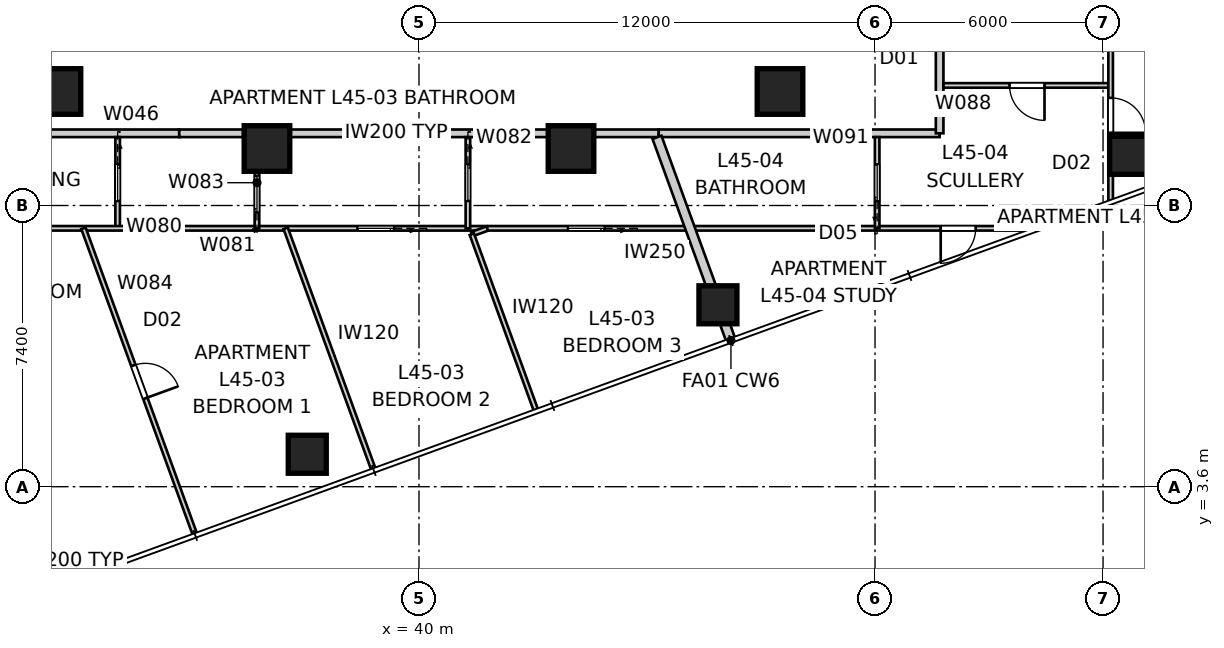
"""IFC4 building model, lengths in metres.
Left out: names, types, materials, properties, quantities, classifications, styles, units other than length and angle.
Written with IfcOpenShell. Run it as: python <this file> out.ifc"""

import sys

from ifc_helpers import new_model, si_unit, direction, frame, frame_2d, origin, origin_2d, place, context, subcontext, project, spatial, rectangle, extrude, element, fill, save


model = new_model("IFC4")
c1 = context("Model", 3, precision=1e-05, world=origin(), true_north=direction((0.0, 1.0)))
c2 = subcontext(c1, "Body", "Model", "MODEL_VIEW")
j1 = project(units=[si_unit("LENGTHUNIT", "METRE"), si_unit("PLANEANGLEUNIT", "RADIAN")], contexts=[c1])
p1 = place(None, origin())
s1 = spatial("IfcSite", under=j1, at=p1, CompositionType="ELEMENT")
p2 = place(p1, origin())
s2 = spatial("IfcBuilding", under=s1, at=p2, CompositionType="ELEMENT")
p3 = place(p2, frame((0.0, 0.0, 164.2)))
s3 = spatial("IfcBuildingStorey", under=s2, at=p3, CompositionType="ELEMENT", Elevation=164.2)
for number, where, z_axis, x_axis in (
    (1, (37.06, 4.454, 0.0), (0.0, 0.0, 1.0), (1.0, 0.0, 0.0)),
    (2, (47.866, 8.387, 0.0), (0.0, 0.0, 1.0), (1.0, 0.0, 0.0)),
    (3, (58.673, 12.32, 0.0), (0.0, 0.0, 1.0), (1.0, 0.0, 0.0)),
):
    element("IfcColumn", number, at=place(p3, frame(where, z_axis=z_axis, x_axis=x_axis)), inside=s3, PredefinedType="COLUMN", context=c2, shape_type="SweptSolid", body=[
        extrude(rectangle(XDim=1.0, YDim=1.0, at=origin_2d()), origin(), (0.0, 0.0, 1.0), 3.4),
    ])
for number, where, z_axis, x_axis in (
    (4, (30.5, 14.0, 0.0), (0.0, 0.0, 1.0), (1.0, 0.0, 0.0)),
    (5, (36.0, 12.5, 0.0), (0.0, 0.0, 1.0), (1.0, 0.0, 0.0)),
    (6, (44.0, 12.5, 0.0), (0.0, 0.0, 1.0), (1.0, 0.0, 0.0)),
    (7, (49.5, 14.0, 0.0), (0.0, 0.0, 1.0), (1.0, 0.0, 0.0)),
):
    element("IfcColumn", number, at=place(p3, frame(where, z_axis=z_axis, x_axis=x_axis)), inside=s3, PredefinedType="COLUMN", context=c2, shape_type="SweptSolid", body=[
        extrude(rectangle(XDim=1.2, YDim=1.2, at=origin_2d()), origin(), (0.0, 0.0, 1.0), 3.4),
    ])
p4 = place(p3, frame((25.5, 12.9, 0.0), z_axis=(0.0, 0.0, 1.0), x_axis=(1.0, 0.0, 0.0)))
e8 = element("IfcWall", 8, at=p4, inside=s3, PredefinedType="PARTITIONING", context=c2, shape_type="SweptSolid", body=[
    extrude(rectangle(XDim=8.192, YDim=0.2, at=frame_2d((4.096, 0.0))), origin(), (0.0, 0.0, 1.0), 3.25),
])
p5 = place(p4, frame((2.95, 0.0, 0.0)))
e9 = element("IfcOpeningElement", 9, at=p5, cuts=e8, PredefinedType="OPENING", context=c2, shape_type="SweptSolid", body=[
    extrude(rectangle(XDim=1.02, YDim=2.34, at=frame_2d((0.51, 1.17))), frame((0.0, 0.11, 0.0), z_axis=(0.0, -1.0, 0.0), x_axis=(1.0, 0.0, 0.0)), (0.0, 0.0, 1.0), 0.22),
])
p6 = place(p3, frame((33.692, 12.9, 0.0), z_axis=(0.0, 0.0, 1.0), x_axis=(1.0, 0.0, 0.0)))
e10 = element("IfcWall", 10, at=p6, inside=s3, PredefinedType="PARTITIONING", context=c2, shape_type="SweptSolid", body=[
    extrude(rectangle(XDim=1.683, YDim=0.2, at=frame_2d((0.842, 0.0))), origin(), (0.0, 0.0, 1.0), 2.55),
])
p7 = place(p3, frame((35.375, 12.9, 0.0), z_axis=(0.0, 0.0, 1.0), x_axis=(1.0, 0.0, 0.0)))
e11 = element("IfcWall", 11, at=p7, inside=s3, PredefinedType="PARTITIONING", context=c2, shape_type="SweptSolid", body=[
    extrude(rectangle(XDim=9.25, YDim=0.2, at=frame_2d((4.625, 0.0))), origin(), (0.0, 0.0, 1.0), 3.25),
])
p8 = place(p3, frame((44.625, 12.9, 0.0), z_axis=(0.0, 0.0, 1.0), x_axis=(1.0, 0.0, 0.0)))
e12 = element("IfcWall", 12, at=p8, inside=s3, PredefinedType="PARTITIONING", context=c2, shape_type="SweptSolid", body=[
    extrude(rectangle(XDim=1.683, YDim=0.2, at=frame_2d((0.842, 0.0))), origin(), (0.0, 0.0, 1.0), 2.55),
])
p9 = place(p3, frame((46.308, 12.9, 0.0), z_axis=(0.0, 0.0, 1.0), x_axis=(1.0, 0.0, 0.0)))
e13 = element("IfcWall", 13, at=p9, inside=s3, PredefinedType="PARTITIONING", context=c2, shape_type="SweptSolid", body=[
    extrude(rectangle(XDim=7.392, YDim=0.2, at=frame_2d((3.696, 0.0))), origin(), (0.0, 0.0, 1.0), 3.25),
])
p10 = place(p3, frame((53.7, 12.9, 0.0), z_axis=(0.0, 0.0, 1.0), x_axis=(0.0, 1.0, 0.0)))
e14 = element("IfcWall", 14, at=p10, inside=s3, PredefinedType="PARTITIONING", context=c2, shape_type="SweptSolid", body=[
    extrude(rectangle(XDim=33.8, YDim=0.2, at=frame_2d((16.9, 0.0))), origin(), (0.0, 0.0, 1.0), 3.25),
])
p11 = place(p10, frame((29.25, 0.0, 0.0)))
e15 = element("IfcOpeningElement", 15, at=p11, cuts=e14, PredefinedType="OPENING", context=c2, shape_type="SweptSolid", body=[
    extrude(rectangle(XDim=1.02, YDim=2.1, at=frame_2d((0.51, 1.05))), frame((0.0, 0.11, 0.0), z_axis=(0.0, -1.0, 0.0), x_axis=(1.0, 0.0, 0.0)), (0.0, 0.0, 1.0), 0.22),
])
p12 = place(p10, frame((2.87, 0.0, 0.0)))
e16 = element("IfcOpeningElement", 16, at=p12, cuts=e14, PredefinedType="OPENING", context=c2, shape_type="SweptSolid", body=[
    extrude(rectangle(XDim=1.02, YDim=2.34, at=frame_2d((0.51, 1.17))), frame((0.0, 0.11, 0.0), z_axis=(0.0, -1.0, 0.0), x_axis=(1.0, 0.0, 0.0)), (0.0, 0.0, 1.0), 0.22),
])
p13 = place(p3, frame((48.208, 7.447, 0.0), z_axis=(0.0, 0.0, 1.0), x_axis=(-0.342004838392, 0.939698191185, 0.0)))
e17 = element("IfcWall", 17, at=p13, inside=s3, PredefinedType="PARTITIONING", context=c2, shape_type="SweptSolid", body=[
    extrude(rectangle(XDim=5.691, YDim=0.25, at=frame_2d((2.845, 0.0))), origin(), (0.0, 0.0, 1.0), 3.25),
])
p14 = place(p3, frame((32.071, 12.8, 0.0), z_axis=(0.0, 0.0, 1.0), x_axis=(0.0, -1.0, 0.0)))
e18 = element("IfcWall", 18, at=p14, inside=s3, PredefinedType="PARTITIONING", context=c2, shape_type="SweptSolid", body=[
    extrude(rectangle(XDim=2.4, YDim=0.12, at=frame_2d((1.2, 0.0))), origin(), (0.0, 0.0, 1.0), 3.25),
])
p15 = place(p14, frame((0.72, 0.0, 0.0)))
e19 = element("IfcOpeningElement", 19, at=p15, cuts=e18, PredefinedType="OPENING", context=c2, shape_type="SweptSolid", body=[
    extrude(rectangle(XDim=0.96, YDim=2.1, at=frame_2d((0.48, 1.05))), frame((0.0, 0.07, 0.0), z_axis=(0.0, -1.0, 0.0), x_axis=(1.0, 0.0, 0.0)), (0.0, 0.0, 1.0), 0.14),
])
p16 = place(p3, frame((56.281, 10.4, 0.0), z_axis=(0.0, 0.0, 1.0), x_axis=(-1.0, 0.0, 0.0)))
e20 = element("IfcWall", 20, at=p16, inside=s3, PredefinedType="PARTITIONING", context=c2, shape_type="SweptSolid", body=[
    extrude(rectangle(XDim=34.647, YDim=0.12, at=frame_2d((17.324, 0.0))), origin(), (0.0, 0.0, 1.0), 3.25),
])
p17 = place(p16, frame((29.309, 0.0, 0.0)))
e21 = element("IfcOpeningElement", 21, at=p17, cuts=e20, PredefinedType="OPENING", context=c2, shape_type="SweptSolid", body=[
    extrude(rectangle(XDim=0.92, YDim=2.34, at=frame_2d((0.46, 1.17))), frame((0.0, 0.07, 0.0), z_axis=(0.0, -1.0, 0.0), x_axis=(1.0, 0.0, 0.0)), (0.0, 0.0, 1.0), 0.14),
])
p18 = place(p16, frame((1.632, 0.0, 0.0)))
e22 = element("IfcOpeningElement", 22, at=p18, cuts=e20, PredefinedType="OPENING", context=c2, shape_type="SweptSolid", body=[
    extrude(rectangle(XDim=0.92, YDim=2.1, at=frame_2d((0.46, 1.05))), frame((0.0, 0.07, 0.0), z_axis=(0.0, -1.0, 0.0), x_axis=(1.0, 0.0, 0.0)), (0.0, 0.0, 1.0), 0.14),
])
p19 = place(p16, frame((16.938, 0.0, 0.0)))
e23 = element("IfcOpeningElement", 23, at=p19, cuts=e20, PredefinedType="OPENING", context=c2, shape_type="SweptSolid", body=[
    extrude(rectangle(XDim=0.96, YDim=2.1, at=frame_2d((0.48, 1.05))), frame((0.0, 0.07, 0.0), z_axis=(0.0, -1.0, 0.0), x_axis=(1.0, 0.0, 0.0)), (0.0, 0.0, 1.0), 0.14),
])
p20 = place(p16, frame((11.4, 0.0, 0.0)))
e24 = element("IfcOpeningElement", 24, at=p20, cuts=e20, PredefinedType="OPENING", context=c2, shape_type="SweptSolid", body=[
    extrude(rectangle(XDim=0.96, YDim=2.1, at=frame_2d((0.48, 1.05))), frame((0.0, 0.07, 0.0), z_axis=(0.0, -1.0, 0.0), x_axis=(1.0, 0.0, 0.0)), (0.0, 0.0, 1.0), 0.14),
])
p21 = place(p3, frame((41.287, 12.8, 0.0), z_axis=(0.0, 0.0, 1.0), x_axis=(0.0, -1.0, 0.0)))
e25 = element("IfcWall", 25, at=p21, inside=s3, PredefinedType="PARTITIONING", context=c2, shape_type="SweptSolid", body=[
    extrude(rectangle(XDim=2.4, YDim=0.12, at=frame_2d((1.2, 0.0))), origin(), (0.0, 0.0, 1.0), 3.25),
])
p22 = place(p21, frame((0.72, 0.0, 0.0)))
e26 = element("IfcOpeningElement", 26, at=p22, cuts=e25, PredefinedType="OPENING", context=c2, shape_type="SweptSolid", body=[
    extrude(rectangle(XDim=0.96, YDim=2.1, at=frame_2d((0.48, 1.05))), frame((0.0, 0.07, 0.0), z_axis=(0.0, -1.0, 0.0), x_axis=(1.0, 0.0, 0.0)), (0.0, 0.0, 1.0), 0.14),
])
p23 = place(p3, frame((35.737, 10.4, 0.0), z_axis=(0.0, 0.0, 1.0), x_axis=(0.0, 1.0, 0.0)))
e27 = element("IfcWall", 27, at=p23, inside=s3, PredefinedType="PARTITIONING", context=c2, shape_type="SweptSolid", body=[
    extrude(rectangle(XDim=2.4, YDim=0.12, at=frame_2d((1.2, 0.0))), origin(), (0.0, 0.0, 1.0), 3.25),
])
p24 = place(p23, frame((0.42, 0.0, 0.0)))
e28 = element("IfcOpeningElement", 28, at=p24, cuts=e27, PredefinedType="OPENING", context=c2, shape_type="SweptSolid", body=[
    extrude(rectangle(XDim=0.96, YDim=2.1, at=frame_2d((0.48, 1.05))), frame((0.0, 0.07, 0.0), z_axis=(0.0, -1.0, 0.0), x_axis=(1.0, 0.0, 0.0)), (0.0, 0.0, 1.0), 0.14),
])
p25 = place(p3, frame((31.171, 10.4, 0.0), z_axis=(0.0, 0.0, 1.0), x_axis=(0.34202238111, -0.939691806296, 0.0)))
e29 = element("IfcWall", 29, at=p25, inside=s3, PredefinedType="PARTITIONING", context=c2, shape_type="SweptSolid", body=[
    extrude(rectangle(XDim=8.562, YDim=0.12, at=frame_2d((4.281, 0.0))), origin(), (0.0, 0.0, 1.0), 3.25),
])
p26 = place(p25, frame((3.841, 0.0, 0.0)))
e30 = element("IfcOpeningElement", 30, at=p26, cuts=e29, PredefinedType="OPENING", context=c2, shape_type="SweptSolid", body=[
    extrude(rectangle(XDim=0.92, YDim=2.34, at=frame_2d((0.46, 1.17))), frame((0.0, 0.07, 0.0), z_axis=(0.0, -1.0, 0.0), x_axis=(1.0, 0.0, 0.0)), (0.0, 0.0, 1.0), 0.14),
])
p27 = place(p3, frame((36.492, 10.4, 0.0), z_axis=(0.0, 0.0, 1.0), x_axis=(0.342030900012, -0.939688705602, 0.0)))
e31 = element("IfcWall", 31, at=p27, inside=s3, PredefinedType="PARTITIONING", context=c2, shape_type="SweptSolid", body=[
    extrude(rectangle(XDim=6.742, YDim=0.12, at=frame_2d((3.371, 0.0))), origin(), (0.0, 0.0, 1.0), 3.25),
])
p28 = place(p3, frame((41.799, 10.395, 0.0), z_axis=(0.0, 0.0, 1.0), x_axis=(-0.939678576029, -0.342058728513, 0.0)))
e32 = element("IfcWall", 32, at=p28, inside=s3, PredefinedType="PARTITIONING", context=c2, shape_type="SweptSolid", body=[
    extrude(rectangle(XDim=0.435, YDim=0.12, at=frame_2d((0.217, 0.0))), origin(), (0.0, 0.0, 1.0), 3.25),
])
p29 = place(p3, frame((41.39, 10.246, 0.0), z_axis=(0.0, 0.0, 1.0), x_axis=(0.342017860496, -0.939693451665, 0.0)))
e33 = element("IfcWall", 33, at=p29, inside=s3, PredefinedType="PARTITIONING", context=c2, shape_type="SweptSolid", body=[
    extrude(rectangle(XDim=4.922, YDim=0.12, at=frame_2d((2.461, 0.0))), origin(), (0.0, 0.0, 1.0), 3.25),
])
p30 = place(p3, frame((58.2, 14.16, 0.0), z_axis=(0.0, 0.0, 1.0), x_axis=(-1.0, 0.0, 0.0)))
e34 = element("IfcWall", 34, at=p30, inside=s3, PredefinedType="PARTITIONING", context=c2, shape_type="SweptSolid", body=[
    extrude(rectangle(XDim=4.4, YDim=0.12, at=frame_2d((2.2, 0.0))), origin(), (0.0, 0.0, 1.0), 3.25),
])
p31 = place(p30, frame((1.74, 0.0, 0.0)))
e35 = element("IfcOpeningElement", 35, at=p31, cuts=e34, PredefinedType="OPENING", context=c2, shape_type="SweptSolid", body=[
    extrude(rectangle(XDim=0.92, YDim=2.34, at=frame_2d((0.46, 1.17))), frame((0.0, 0.07, 0.0), z_axis=(0.0, -1.0, 0.0), x_axis=(1.0, 0.0, 0.0)), (0.0, 0.0, 1.0), 0.14),
])
p32 = place(p3, frame((58.2, 47.266, 0.0), z_axis=(0.0, 0.0, 1.0), x_axis=(0.0, -1.0, 0.0)))
e36 = element("IfcWall", 36, at=p32, inside=s3, PredefinedType="PARTITIONING", context=c2, shape_type="SweptSolid", body=[
    extrude(rectangle(XDim=36.14, YDim=0.12, at=frame_2d((18.07, 0.0))), origin(), (0.0, 0.0, 1.0), 3.25),
])
p33 = place(p32, frame((2.227, 0.0, 0.0)))
e37 = element("IfcOpeningElement", 37, at=p33, cuts=e36, PredefinedType="OPENING", context=c2, shape_type="SweptSolid", body=[
    extrude(rectangle(XDim=0.92, YDim=2.34, at=frame_2d((0.46, 1.17))), frame((0.0, 0.07, 0.0), z_axis=(0.0, -1.0, 0.0), x_axis=(1.0, 0.0, 0.0)), (0.0, 0.0, 1.0), 0.14),
])
p34 = place(p32, frame((5.95, 0.0, 0.0)))
e38 = element("IfcOpeningElement", 38, at=p34, cuts=e36, PredefinedType="OPENING", context=c2, shape_type="SweptSolid", body=[
    extrude(rectangle(XDim=0.92, YDim=2.34, at=frame_2d((0.46, 1.17))), frame((0.0, 0.07, 0.0), z_axis=(0.0, -1.0, 0.0), x_axis=(1.0, 0.0, 0.0)), (0.0, 0.0, 1.0), 0.14),
])
p35 = place(p32, frame((29.769, 0.0, 0.0)))
e39 = element("IfcOpeningElement", 39, at=p35, cuts=e36, PredefinedType="OPENING", context=c2, shape_type="SweptSolid", body=[
    extrude(rectangle(XDim=0.92, YDim=2.34, at=frame_2d((0.46, 1.17))), frame((0.0, 0.07, 0.0), z_axis=(0.0, -1.0, 0.0), x_axis=(1.0, 0.0, 0.0)), (0.0, 0.0, 1.0), 0.14),
])
p36 = place(p32, frame((14.168, 0.0, 0.0)))
e40 = element("IfcOpeningElement", 40, at=p36, cuts=e36, PredefinedType="OPENING", context=c2, shape_type="SweptSolid", body=[
    extrude(rectangle(XDim=0.92, YDim=2.34, at=frame_2d((0.46, 1.17))), frame((0.0, 0.07, 0.0), z_axis=(0.0, -1.0, 0.0), x_axis=(1.0, 0.0, 0.0)), (0.0, 0.0, 1.0), 0.14),
])
p37 = place(p32, frame((33.434, 0.0, 0.0)))
e41 = element("IfcOpeningElement", 41, at=p37, cuts=e36, PredefinedType="OPENING", context=c2, shape_type="SweptSolid", body=[
    extrude(rectangle(XDim=0.92, YDim=2.34, at=frame_2d((0.46, 1.17))), frame((0.0, 0.07, 0.0), z_axis=(0.0, -1.0, 0.0), x_axis=(1.0, 0.0, 0.0)), (0.0, 0.0, 1.0), 0.14),
])
p38 = place(p3, frame((52.056, 10.4, 0.0), z_axis=(0.0, 0.0, 1.0), x_axis=(0.0, 1.0, 0.0)))
e42 = element("IfcWall", 42, at=p38, inside=s3, PredefinedType="PARTITIONING", context=c2, shape_type="SweptSolid", body=[
    extrude(rectangle(XDim=2.4, YDim=0.12, at=frame_2d((1.2, 0.0))), origin(), (0.0, 0.0, 1.0), 3.25),
])
p39 = place(p38, frame((0.72, 0.0, 0.0)))
e43 = element("IfcOpeningElement", 43, at=p39, cuts=e42, PredefinedType="OPENING", context=c2, shape_type="SweptSolid", body=[
    extrude(rectangle(XDim=0.96, YDim=2.1, at=frame_2d((0.48, 1.05))), frame((0.0, 0.07, 0.0), z_axis=(0.0, -1.0, 0.0), x_axis=(1.0, 0.0, 0.0)), (0.0, 0.0, 1.0), 0.14),
])
p40 = place(p15, origin())
e44 = element("IfcDoor", 44, at=p40, inside=s3, OperationType="SLIDING_TO_LEFT", PredefinedType="DOOR", context=c2, shape_type="SweptSolid", body=[
    extrude(rectangle(XDim=0.96, YDim=2.1, at=frame_2d((0.48, 1.05))), frame((0.0, 0.025, 0.0), z_axis=(0.0, -1.0, 0.0), x_axis=(1.0, 0.0, 0.0)), (0.0, 0.0, 1.0), 0.05),
])
fill(e19, e44)
p41 = place(p31, origin())
e45 = element("IfcDoor", 45, at=p41, inside=s3, OperationType="SINGLE_SWING_LEFT", PredefinedType="DOOR", context=c2, shape_type="SweptSolid", body=[
    extrude(rectangle(XDim=0.92, YDim=2.34, at=frame_2d((0.46, 1.17))), frame((0.0, 0.025, 0.0), z_axis=(0.0, -1.0, 0.0), x_axis=(1.0, 0.0, 0.0)), (0.0, 0.0, 1.0), 0.05),
])
fill(e35, e45)
p42 = place(p26, origin())
e46 = element("IfcDoor", 46, at=p42, inside=s3, OperationType="SINGLE_SWING_RIGHT", PredefinedType="DOOR", context=c2, shape_type="SweptSolid", body=[
    extrude(rectangle(XDim=0.92, YDim=2.34, at=frame_2d((0.46, 1.17))), frame((0.0, 0.025, 0.0), z_axis=(0.0, -1.0, 0.0), x_axis=(1.0, 0.0, 0.0)), (0.0, 0.0, 1.0), 0.05),
])
fill(e30, e46)
p43 = place(p24, origin())
e47 = element("IfcDoor", 47, at=p43, inside=s3, OperationType="SLIDING_TO_LEFT", PredefinedType="DOOR", context=c2, shape_type="SweptSolid", body=[
    extrude(rectangle(XDim=0.96, YDim=2.1, at=frame_2d((0.48, 1.05))), frame((0.0, 0.025, 0.0), z_axis=(0.0, -1.0, 0.0), x_axis=(1.0, 0.0, 0.0)), (0.0, 0.0, 1.0), 0.05),
])
fill(e28, e47)
p44 = place(p18, origin())
e48 = element("IfcDoor", 48, at=p44, inside=s3, OperationType="SINGLE_SWING_RIGHT", PredefinedType="DOOR", context=c2, shape_type="SweptSolid", body=[
    extrude(rectangle(XDim=0.92, YDim=2.1, at=frame_2d((0.46, 1.05))), frame((0.0, 0.025, 0.0), z_axis=(0.0, -1.0, 0.0), x_axis=(1.0, 0.0, 0.0)), (0.0, 0.0, 1.0), 0.05),
])
fill(e22, e48)
p45 = place(p37, origin())
e49 = element("IfcDoor", 49, at=p45, inside=s3, OperationType="SINGLE_SWING_RIGHT", PredefinedType="DOOR", context=c2, shape_type="SweptSolid", body=[
    extrude(rectangle(XDim=0.92, YDim=2.34, at=frame_2d((0.46, 1.17))), frame((0.0, 0.025, 0.0), z_axis=(0.0, -1.0, 0.0), x_axis=(1.0, 0.0, 0.0)), (0.0, 0.0, 1.0), 0.05),
])
fill(e41, e49)
p46 = place(p39, origin())
e50 = element("IfcDoor", 50, at=p46, inside=s3, OperationType="SLIDING_TO_LEFT", PredefinedType="DOOR", context=c2, shape_type="SweptSolid", body=[
    extrude(rectangle(XDim=0.96, YDim=2.1, at=frame_2d((0.48, 1.05))), frame((0.0, 0.025, 0.0), z_axis=(0.0, -1.0, 0.0), x_axis=(1.0, 0.0, 0.0)), (0.0, 0.0, 1.0), 0.05),
])
fill(e43, e50)
p47 = place(p19, origin())
e51 = element("IfcDoor", 51, at=p47, inside=s3, OperationType="SLIDING_TO_LEFT", PredefinedType="DOOR", context=c2, shape_type="SweptSolid", body=[
    extrude(rectangle(XDim=0.96, YDim=2.1, at=frame_2d((0.48, 1.05))), frame((0.0, 0.025, 0.0), z_axis=(0.0, -1.0, 0.0), x_axis=(1.0, 0.0, 0.0)), (0.0, 0.0, 1.0), 0.05),
])
fill(e23, e51)
p48 = place(p22, origin())
e52 = element("IfcDoor", 52, at=p48, inside=s3, OperationType="SLIDING_TO_LEFT", PredefinedType="DOOR", context=c2, shape_type="SweptSolid", body=[
    extrude(rectangle(XDim=0.96, YDim=2.1, at=frame_2d((0.48, 1.05))), frame((0.0, 0.025, 0.0), z_axis=(0.0, -1.0, 0.0), x_axis=(1.0, 0.0, 0.0)), (0.0, 0.0, 1.0), 0.05),
])
fill(e26, e52)
p49 = place(p20, origin())
e53 = element("IfcDoor", 53, at=p49, inside=s3, OperationType="SLIDING_TO_LEFT", PredefinedType="DOOR", context=c2, shape_type="SweptSolid", body=[
    extrude(rectangle(XDim=0.96, YDim=2.1, at=frame_2d((0.48, 1.05))), frame((0.0, 0.025, 0.0), z_axis=(0.0, -1.0, 0.0), x_axis=(1.0, 0.0, 0.0)), (0.0, 0.0, 1.0), 0.05),
])
fill(e24, e53)
save(model, sys.argv[1])
